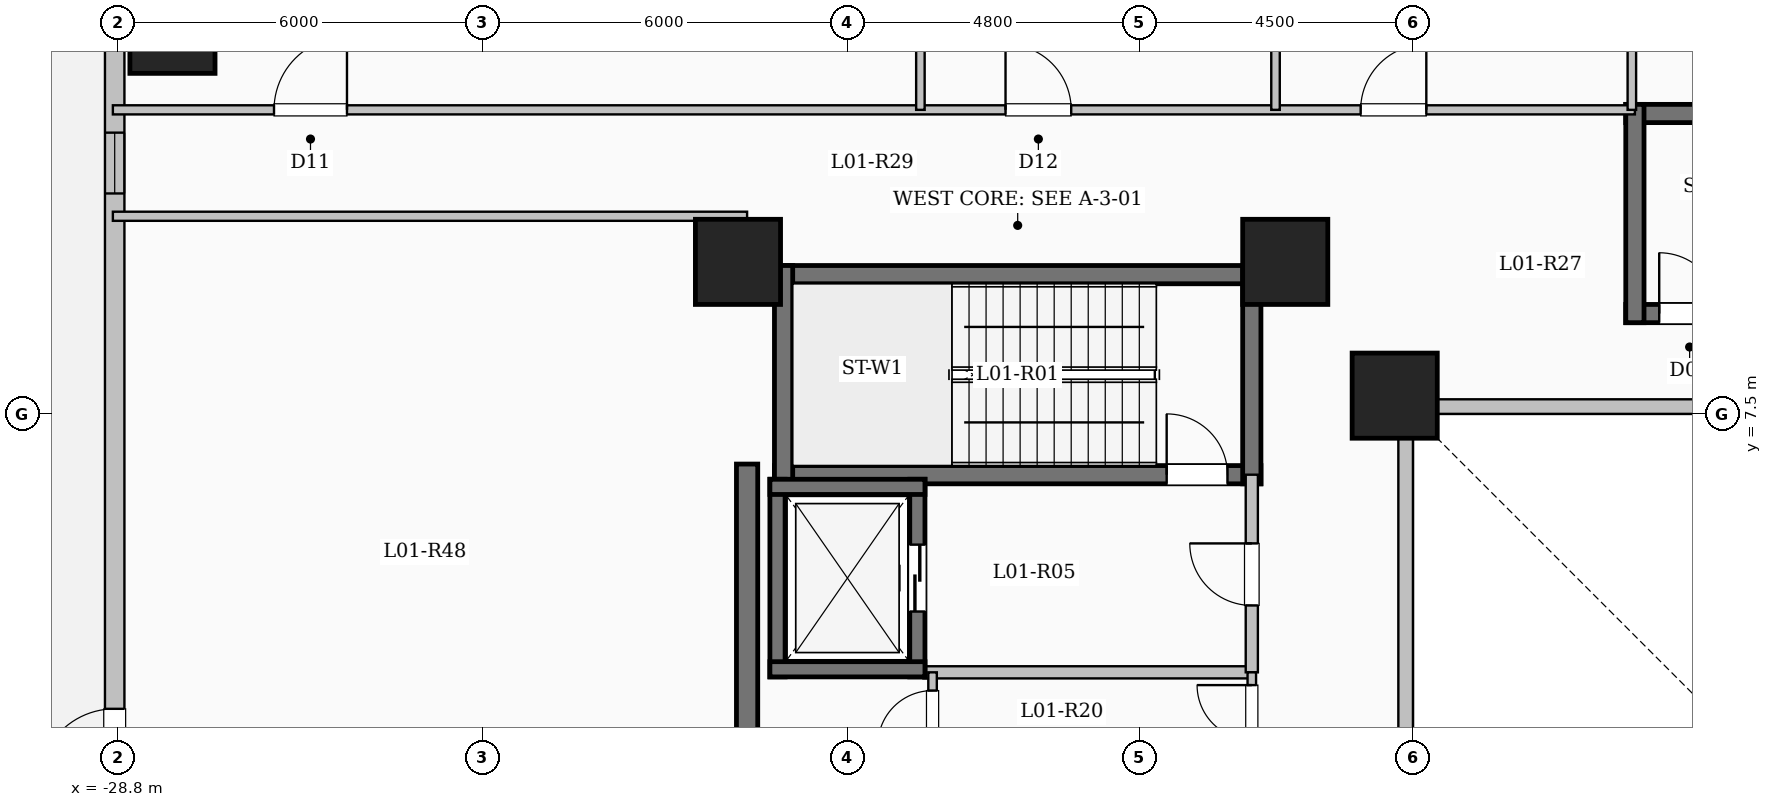
"""IFC4 building model, lengths in metres.
Left out: names, types, materials, properties, quantities, classifications, styles, units other than length and angle.
Written with IfcOpenShell. Run it as: python <this file> out.ifc"""

import sys

from ifc_helpers import new_model, si_unit, direction, frame, frame_2d, origin, origin_2d, place, context, subcontext, project, spatial, rectangle, extrude, element, fill, save


model = new_model("IFC4")
c1 = context("Model", 3, precision=1e-05, world=origin(), true_north=direction((0.0, 1.0)))
c2 = subcontext(c1, "Body", "Model", "MODEL_VIEW")
j1 = project(units=[si_unit("LENGTHUNIT", "METRE"), si_unit("PLANEANGLEUNIT", "RADIAN")], contexts=[c1])
p1 = place(None, origin())
s1 = spatial("IfcSite", under=j1, at=p1, CompositionType="ELEMENT")
p2 = place(p1, origin())
s2 = spatial("IfcBuilding", under=s1, at=p2, CompositionType="ELEMENT")
p3 = place(p2, frame((0.0, 0.0, 5.4)))
s3 = spatial("IfcBuildingStorey", under=s2, at=p3, CompositionType="ELEMENT", Elevation=5.4)
for number, where, z_axis, x_axis in (
    (1, (-7.8, 7.8, 0.0), (0.0, 0.0, 1.0), (1.0, 0.0, 0.0)),
    (2, (-9.6, 10.0, 0.0), (0.0, 0.0, 1.0), (1.0, 0.0, 0.0)),
    (3, (-18.6, 10.0, 0.0), (0.0, 0.0, 1.0), (1.0, 0.0, 0.0)),
    (4, (-27.9, 13.8, 0.0), (0.0, 0.0, 1.0), (1.0, 0.0, 0.0)),
):
    element("IfcColumn", number, at=place(p3, frame(where, z_axis=z_axis, x_axis=x_axis)), inside=s3, PredefinedType="COLUMN", context=c2, shape_type="SweptSolid", body=[
        extrude(rectangle(XDim=1.4, YDim=1.4, at=origin_2d()), origin(), (0.0, 0.0, 1.0), 4.5),
    ])
p4 = place(p3, frame((7.62, 7.62, 0.0), z_axis=(0.0, 0.0, 1.0), x_axis=(-1.0, 0.0, 0.0)))
e5 = element("IfcWall", 5, at=p4, inside=s3, PredefinedType="SOLIDWALL", context=c2, shape_type="SweptSolid", body=[
    extrude(rectangle(XDim=15.24, YDim=0.24, at=frame_2d((7.62, 0.0))), origin(), (0.0, 0.0, 1.0), 4.2),
])
p5 = place(p4, frame((6.92, 0.0, 0.95)))
e6 = element("IfcOpeningElement", 6, at=p5, cuts=e5, PredefinedType="OPENING", context=c2, shape_type="SweptSolid", body=[
    extrude(rectangle(XDim=1.4, YDim=1.5, at=frame_2d((0.7, 0.75))), frame((0.0, 0.13, 0.0), z_axis=(0.0, -1.0, 0.0), x_axis=(1.0, 0.0, 0.0)), (0.0, 0.0, 1.0), 0.26),
])
p6 = place(p3, frame((-7.62, 7.62, 0.0), z_axis=(0.0, 0.0, 1.0), x_axis=(0.0, -1.0, 0.0)))
e7 = element("IfcWall", 7, at=p6, inside=s3, PredefinedType="SOLIDWALL", context=c2, shape_type="SweptSolid", body=[
    extrude(rectangle(XDim=15.24, YDim=0.24, at=frame_2d((7.62, 0.0))), origin(), (0.0, 0.0, 1.0), 4.2),
])
p7 = place(p6, frame((6.92, 0.0, 0.95)))
e8 = element("IfcOpeningElement", 8, at=p7, cuts=e7, PredefinedType="OPENING", context=c2, shape_type="SweptSolid", body=[
    extrude(rectangle(XDim=1.4, YDim=1.5, at=frame_2d((0.7, 0.75))), frame((0.0, 0.13, 0.0), z_axis=(0.0, -1.0, 0.0), x_axis=(1.0, 0.0, 0.0)), (0.0, 0.0, 1.0), 0.26),
])
p8 = place(p3, frame((-28.85, -29.85, 0.0), z_axis=(0.0, 0.0, 1.0), x_axis=(0.0, 1.0, 0.0)))
e9 = element("IfcWall", 9, at=p8, inside=s3, PredefinedType="SOLIDWALL", context=c2, shape_type="SweptSolid", body=[
    extrude(rectangle(XDim=59.7, YDim=0.32, at=frame_2d((29.85, 0.0))), origin(), (0.0, 0.0, 1.0), 4.2),
])
p9 = place(p8, frame((31.25, 0.0, 0.0)))
e10 = element("IfcOpeningElement", 10, at=p9, cuts=e9, PredefinedType="OPENING", context=c2, shape_type="SweptSolid", body=[
    extrude(rectangle(XDim=1.25, YDim=2.25, at=frame_2d((0.625, 1.125))), frame((0.0, 0.17, 0.0), z_axis=(0.0, -1.0, 0.0), x_axis=(1.0, 0.0, 0.0)), (0.0, 0.0, 1.0), 0.34),
])
p10 = place(p8, frame((8.65, 0.0, 0.9)))
e11 = element("IfcOpeningElement", 11, at=p10, cuts=e9, PredefinedType="OPENING", context=c2, shape_type="SweptSolid", body=[
    extrude(rectangle(XDim=2.1, YDim=2.0, at=frame_2d((1.05, 1.0))), frame((0.0, 0.17, 0.0), z_axis=(0.0, -1.0, 0.0), x_axis=(1.0, 0.0, 0.0)), (0.0, 0.0, 1.0), 0.34),
])
p11 = place(p8, frame((20.242, 0.0, 0.9)))
e12 = element("IfcOpeningElement", 12, at=p11, cuts=e9, PredefinedType="OPENING", context=c2, shape_type="SweptSolid", body=[
    extrude(rectangle(XDim=1.7, YDim=1.9, at=frame_2d((0.85, 0.95))), frame((0.0, 0.17, 0.0), z_axis=(0.0, -1.0, 0.0), x_axis=(1.0, 0.0, 0.0)), (0.0, 0.0, 1.0), 0.34),
])
p12 = place(p8, frame((26.03, 0.0, 0.9)))
e13 = element("IfcOpeningElement", 13, at=p12, cuts=e9, PredefinedType="OPENING", context=c2, shape_type="SweptSolid", body=[
    extrude(rectangle(XDim=2.1, YDim=2.0, at=frame_2d((1.05, 1.0))), frame((0.0, 0.17, 0.0), z_axis=(0.0, -1.0, 0.0), x_axis=(1.0, 0.0, 0.0)), (0.0, 0.0, 1.0), 0.34),
])
p13 = place(p8, frame((40.975, 0.0, 0.95)))
e14 = element("IfcOpeningElement", 14, at=p13, cuts=e9, PredefinedType="OPENING", context=c2, shape_type="SweptSolid", body=[
    extrude(rectangle(XDim=1.0, YDim=1.5, at=frame_2d((0.5, 0.75))), frame((0.0, 0.17, 0.0), z_axis=(0.0, -1.0, 0.0), x_axis=(1.0, 0.0, 0.0)), (0.0, 0.0, 1.0), 0.34),
])
p14 = place(p8, frame((50.0, 0.0, 0.9)))
e15 = element("IfcOpeningElement", 15, at=p14, cuts=e9, PredefinedType="OPENING", context=c2, shape_type="SweptSolid", body=[
    extrude(rectangle(XDim=2.1, YDim=2.0, at=frame_2d((1.05, 1.0))), frame((0.0, 0.17, 0.0), z_axis=(0.0, -1.0, 0.0), x_axis=(1.0, 0.0, 0.0)), (0.0, 0.0, 1.0), 0.34),
])
p15 = place(p3, frame((-18.0, 9.79, 0.0), z_axis=(0.0, 0.0, 1.0), x_axis=(1.0, 0.0, 0.0)))
e16 = element("IfcWall", 16, at=p15, inside=s3, PredefinedType="SHEAR", context=c2, shape_type="SweptSolid", body=[
    extrude(rectangle(XDim=8.0, YDim=0.3, at=frame_2d((4.0, 0.0))), origin(), (0.0, 0.0, 1.0), 4.5),
])
p16 = place(p3, frame((-18.0, 6.5, 0.0), z_axis=(0.0, 0.0, 1.0), x_axis=(1.0, 0.0, 0.0)))
e17 = element("IfcWall", 17, at=p16, inside=s3, PredefinedType="SHEAR", context=c2, shape_type="SweptSolid", body=[
    extrude(rectangle(XDim=8.0, YDim=0.3, at=frame_2d((4.0, 0.0))), origin(), (0.0, 0.0, 1.0), 4.5),
])
p17 = place(p16, frame((6.45, 0.0, 0.0)))
e18 = element("IfcOpeningElement", 18, at=p17, cuts=e17, PredefinedType="OPENING", context=c2, shape_type="SweptSolid", body=[
    extrude(rectangle(XDim=1.0, YDim=2.15, at=frame_2d((0.5, 1.075))), frame((0.0, 0.16, 0.0), z_axis=(0.0, -1.0, 0.0), x_axis=(1.0, 0.0, 0.0)), (0.0, 0.0, 1.0), 0.32),
])
for number, where, z_axis, x_axis in (
    (19, (-17.85, 6.35, 0.0), (0.0, 0.0, 1.0), (0.0, 1.0, 0.0)),
    (20, (-10.15, 6.35, 0.0), (0.0, 0.0, 1.0), (0.0, 1.0, 0.0)),
):
    element("IfcWall", number, at=place(p3, frame(where, z_axis=z_axis, x_axis=x_axis)), inside=s3, PredefinedType="SHEAR", context=c2, shape_type="SweptSolid", body=[
        extrude(rectangle(XDim=3.59, YDim=0.3, at=frame_2d((1.795, 0.0))), origin(), (0.0, 0.0, 1.0), 4.5),
    ])
p18 = place(p3, frame((-4.0, 12.44, 0.0), z_axis=(0.0, 0.0, 1.0), x_axis=(1.0, 0.0, 0.0)))
e21 = element("IfcWall", 21, at=p18, inside=s3, PredefinedType="SHEAR", context=c2, shape_type="SweptSolid", body=[
    extrude(rectangle(XDim=8.0, YDim=0.3, at=frame_2d((4.0, 0.0))), origin(), (0.0, 0.0, 1.0), 4.5),
])
p19 = place(p3, frame((-4.0, 9.15, 0.0), z_axis=(0.0, 0.0, 1.0), x_axis=(1.0, 0.0, 0.0)))
e22 = element("IfcWall", 22, at=p19, inside=s3, PredefinedType="SHEAR", context=c2, shape_type="SweptSolid", body=[
    extrude(rectangle(XDim=8.0, YDim=0.3, at=frame_2d((4.0, 0.0))), origin(), (0.0, 0.0, 1.0), 4.5),
])
p20 = place(p19, frame((0.55, 0.0, 0.0)))
e23 = element("IfcOpeningElement", 23, at=p20, cuts=e22, PredefinedType="OPENING", context=c2, shape_type="SweptSolid", body=[
    extrude(rectangle(XDim=1.0, YDim=2.15, at=frame_2d((0.5, 1.075))), frame((0.0, 0.16, 0.0), z_axis=(0.0, -1.0, 0.0), x_axis=(1.0, 0.0, 0.0)), (0.0, 0.0, 1.0), 0.32),
])
p21 = place(p3, frame((-3.85, 9.0, 0.0), z_axis=(0.0, 0.0, 1.0), x_axis=(0.0, 1.0, 0.0)))
e24 = element("IfcWall", 24, at=p21, inside=s3, PredefinedType="SHEAR", context=c2, shape_type="SweptSolid", body=[
    extrude(rectangle(XDim=3.59, YDim=0.3, at=frame_2d((1.795, 0.0))), origin(), (0.0, 0.0, 1.0), 4.5),
])
p22 = place(p3, frame((-15.55, 3.25, 0.0), z_axis=(0.0, 0.0, 1.0), x_axis=(1.0, 0.0, 0.0)))
e25 = element("IfcWall", 25, at=p22, inside=s3, PredefinedType="SOLIDWALL", context=c2, shape_type="SweptSolid", body=[
    extrude(rectangle(XDim=5.4, YDim=0.2, at=frame_2d((2.7, 0.0))), origin(), (0.0, 0.0, 1.0), 4.2),
])
p23 = place(p3, frame((-10.15, 3.25, 0.0), z_axis=(0.0, 0.0, 1.0), x_axis=(0.0, 1.0, 0.0)))
e26 = element("IfcWall", 26, at=p23, inside=s3, PredefinedType="SOLIDWALL", context=c2, shape_type="SweptSolid", body=[
    extrude(rectangle(XDim=3.25, YDim=0.2, at=frame_2d((1.625, 0.0))), origin(), (0.0, 0.0, 1.0), 4.2),
])
p24 = place(p23, frame((1.1, 0.0, 0.0)))
e27 = element("IfcOpeningElement", 27, at=p24, cuts=e26, PredefinedType="OPENING", context=c2, shape_type="SweptSolid", body=[
    extrude(rectangle(XDim=1.02, YDim=2.15, at=frame_2d((0.51, 1.075))), frame((0.0, 0.11, 0.0), z_axis=(0.0, -1.0, 0.0), x_axis=(1.0, 0.0, 0.0)), (0.0, 0.0, 1.0), 0.22),
])
p25 = place(p3, frame((-17.95, 3.175, 0.0), z_axis=(0.0, 0.0, 1.0), x_axis=(0.0, 1.0, 0.0)))
e28 = element("IfcWall", 28, at=p25, inside=s3, PredefinedType="SHEAR", context=c2, shape_type="SweptSolid", body=[
    extrude(rectangle(XDim=3.25, YDim=0.25, at=frame_2d((1.625, 0.0))), origin(), (0.0, 0.0, 1.0), 4.5),
])
p26 = place(p3, frame((-15.65, 3.175, 0.0), z_axis=(0.0, 0.0, 1.0), x_axis=(0.0, 1.0, 0.0)))
e29 = element("IfcWall", 29, at=p26, inside=s3, PredefinedType="SHEAR", context=c2, shape_type="SweptSolid", body=[
    extrude(rectangle(XDim=3.25, YDim=0.25, at=frame_2d((1.625, 0.0))), origin(), (0.0, 0.0, 1.0), 4.5),
])
p27 = place(p26, frame((1.075, 0.0, 0.0)))
e30 = element("IfcOpeningElement", 30, at=p27, cuts=e29, PredefinedType="OPENING", context=c2, shape_type="SweptSolid", body=[
    extrude(rectangle(XDim=1.1, YDim=2.15, at=frame_2d((0.55, 1.075))), frame((0.0, 0.135, 0.0), z_axis=(0.0, -1.0, 0.0), x_axis=(1.0, 0.0, 0.0)), (0.0, 0.0, 1.0), 0.27),
])
for number, where, z_axis, x_axis in (
    (31, (-18.075, 3.3, 0.0), (0.0, 0.0, 1.0), (1.0, 0.0, 0.0)),
    (32, (-18.075, 6.3, 0.0), (0.0, 0.0, 1.0), (1.0, 0.0, 0.0)),
):
    element("IfcWall", number, at=place(p3, frame(where, z_axis=z_axis, x_axis=x_axis)), inside=s3, PredefinedType="SHEAR", context=c2, shape_type="SweptSolid", body=[
        extrude(rectangle(XDim=2.55, YDim=0.25, at=frame_2d((1.275, 0.0))), origin(), (0.0, 0.0, 1.0), 4.5),
    ])
p28 = place(p3, frame((-18.45, -7.375, 0.0), z_axis=(0.0, 0.0, 1.0), x_axis=(0.0, 1.0, 0.0)))
e33 = element("IfcWall", 33, at=p28, inside=s3, PredefinedType="SHEAR", context=c2, shape_type="SweptSolid", body=[
    extrude(rectangle(XDim=14.05, YDim=0.35, at=frame_2d((7.025, 0.0))), origin(), (0.0, 0.0, 1.0), 4.5),
])
p29 = place(p3, frame((-10.15, 1.92, 0.0), z_axis=(0.0, 0.0, 1.0), x_axis=(0.0, 1.0, 0.0)))
e34 = element("IfcWall", 34, at=p29, inside=s3, PredefinedType="PARTITIONING", context=c2, shape_type="SweptSolid", body=[
    extrude(rectangle(XDim=1.33, YDim=0.14, at=frame_2d((0.665, 0.0))), origin(), (0.0, 0.0, 1.0), 4.2),
])
p30 = place(p29, frame((0.22, 0.0, 0.0)))
e35 = element("IfcOpeningElement", 35, at=p30, cuts=e34, PredefinedType="OPENING", context=c2, shape_type="SweptSolid", body=[
    extrude(rectangle(XDim=0.9, YDim=2.08, at=frame_2d((0.45, 1.04))), frame((0.0, 0.08, 0.0), z_axis=(0.0, -1.0, 0.0), x_axis=(1.0, 0.0, 0.0)), (0.0, 0.0, 1.0), 0.16),
])
p31 = place(p3, frame((-15.4, -7.2, 0.0), z_axis=(0.0, 0.0, 1.0), x_axis=(0.0, 1.0, 0.0)))
e36 = element("IfcWall", 36, at=p31, inside=s3, PredefinedType="PARTITIONING", context=c2, shape_type="SweptSolid", body=[
    extrude(rectangle(XDim=10.45, YDim=0.14, at=frame_2d((5.225, 0.0))), origin(), (0.0, 0.0, 1.0), 4.2),
])
p32 = place(p31, frame((9.25, 0.0, 0.0)))
e37 = element("IfcOpeningElement", 37, at=p32, cuts=e36, PredefinedType="OPENING", context=c2, shape_type="SweptSolid", body=[
    extrude(rectangle(XDim=0.9, YDim=2.08, at=frame_2d((0.45, 1.04))), frame((0.0, 0.08, 0.0), z_axis=(0.0, -1.0, 0.0), x_axis=(1.0, 0.0, 0.0)), (0.0, 0.0, 1.0), 0.16),
])
p33 = place(p3, frame((-28.88, 12.5, 0.0), z_axis=(0.0, 0.0, 1.0), x_axis=(1.0, 0.0, 0.0)))
e38 = element("IfcWall", 38, at=p33, inside=s3, PredefinedType="PARTITIONING", context=c2, shape_type="SweptSolid", body=[
    extrude(rectangle(XDim=25.03, YDim=0.15, at=frame_2d((12.515, 0.0))), origin(), (0.0, 0.0, 1.0), 4.2),
])
p34 = place(p33, frame((2.65, 0.0, 0.0)))
e39 = element("IfcOpeningElement", 39, at=p34, cuts=e38, PredefinedType="OPENING", context=c2, shape_type="SweptSolid", body=[
    extrude(rectangle(XDim=1.2, YDim=2.15, at=frame_2d((0.6, 1.075))), frame((0.0, 0.085, 0.0), z_axis=(0.0, -1.0, 0.0), x_axis=(1.0, 0.0, 0.0)), (0.0, 0.0, 1.0), 0.17),
])
p35 = place(p33, frame((14.68, 0.0, 0.0)))
e40 = element("IfcOpeningElement", 40, at=p35, cuts=e38, PredefinedType="OPENING", context=c2, shape_type="SweptSolid", body=[
    extrude(rectangle(XDim=1.08, YDim=2.15, at=frame_2d((0.54, 1.075))), frame((0.0, 0.085, 0.0), z_axis=(0.0, -1.0, 0.0), x_axis=(1.0, 0.0, 0.0)), (0.0, 0.0, 1.0), 0.17),
])
p36 = place(p33, frame((20.52, 0.0, 0.0)))
e41 = element("IfcOpeningElement", 41, at=p36, cuts=e38, PredefinedType="OPENING", context=c2, shape_type="SweptSolid", body=[
    extrude(rectangle(XDim=1.08, YDim=2.15, at=frame_2d((0.54, 1.075))), frame((0.0, 0.085, 0.0), z_axis=(0.0, -1.0, 0.0), x_axis=(1.0, 0.0, 0.0)), (0.0, 0.0, 1.0), 0.17),
])
p37 = place(p3, frame((-3.9, 12.5, 0.0), z_axis=(0.0, 0.0, 1.0), x_axis=(0.0, 1.0, 0.0)))
e42 = element("IfcWall", 42, at=p37, inside=s3, PredefinedType="PARTITIONING", context=c2, shape_type="SweptSolid", body=[
    extrude(rectangle(XDim=17.38, YDim=0.14, at=frame_2d((8.69, 0.0))), origin(), (0.0, 0.0, 1.0), 4.2),
])
p38 = place(p3, frame((-15.6, 12.5, 0.0), z_axis=(0.0, 0.0, 1.0), x_axis=(0.0, 1.0, 0.0)))
e43 = element("IfcWall", 43, at=p38, inside=s3, PredefinedType="PARTITIONING", context=c2, shape_type="SweptSolid", body=[
    extrude(rectangle(XDim=17.38, YDim=0.14, at=frame_2d((8.69, 0.0))), origin(), (0.0, 0.0, 1.0), 3.385),
])
p39 = place(p3, frame((-9.76, 12.5, 0.0), z_axis=(0.0, 0.0, 1.0), x_axis=(0.0, 1.0, 0.0)))
e44 = element("IfcWall", 44, at=p39, inside=s3, PredefinedType="PARTITIONING", context=c2, shape_type="SweptSolid", body=[
    extrude(rectangle(XDim=17.38, YDim=0.14, at=frame_2d((8.69, 0.0))), origin(), (0.0, 0.0, 1.0), 4.2),
])
p40 = place(p3, frame((-28.88, 10.75, 0.0), z_axis=(0.0, 0.0, 1.0), x_axis=(1.0, 0.0, 0.0)))
e45 = element("IfcWall", 45, at=p40, inside=s3, PredefinedType="PARTITIONING", context=c2, shape_type="SweptSolid", body=[
    extrude(rectangle(XDim=10.43, YDim=0.15, at=frame_2d((5.215, 0.0))), origin(), (0.0, 0.0, 1.0), 4.2),
])
p41 = place(p9, origin())
e46 = element("IfcDoor", 46, at=p41, inside=s3, OperationType="SINGLE_SWING_LEFT", PredefinedType="DOOR", context=c2, shape_type="SweptSolid", body=[
    extrude(rectangle(XDim=1.25, YDim=2.25, at=frame_2d((0.625, 1.125))), frame((0.0, 0.025, 0.0), z_axis=(0.0, -1.0, 0.0), x_axis=(1.0, 0.0, 0.0)), (0.0, 0.0, 1.0), 0.05),
])
fill(e10, e46)
p42 = place(p13, origin())
e47 = element("IfcWindow", 47, at=p42, inside=s3, PartitioningType="SINGLE_PANEL", PredefinedType="WINDOW", context=c2, shape_type="SweptSolid", body=[
    extrude(rectangle(XDim=1.0, YDim=1.5, at=frame_2d((0.5, 0.75))), frame((0.0, 0.03, 0.0), z_axis=(0.0, -1.0, 0.0), x_axis=(1.0, 0.0, 0.0)), (0.0, 0.0, 1.0), 0.06),
])
fill(e14, e47)
p43 = place(p17, origin())
e48 = element("IfcDoor", 48, at=p43, inside=s3, OperationType="SINGLE_SWING_LEFT", PredefinedType="DOOR", context=c2, shape_type="SweptSolid", body=[
    extrude(rectangle(XDim=1.0, YDim=2.15, at=frame_2d((0.5, 1.075))), frame((0.0, 0.025, 0.0), z_axis=(0.0, -1.0, 0.0), x_axis=(1.0, 0.0, 0.0)), (0.0, 0.0, 1.0), 0.05),
])
fill(e18, e48)
p44 = place(p20, origin())
e49 = element("IfcDoor", 49, at=p44, inside=s3, OperationType="SINGLE_SWING_LEFT", PredefinedType="DOOR", context=c2, shape_type="SweptSolid", body=[
    extrude(rectangle(XDim=1.0, YDim=2.15, at=frame_2d((0.5, 1.075))), frame((0.0, 0.025, 0.0), z_axis=(0.0, -1.0, 0.0), x_axis=(1.0, 0.0, 0.0)), (0.0, 0.0, 1.0), 0.05),
])
fill(e23, e49)
p45 = place(p24, origin())
e50 = element("IfcDoor", 50, at=p45, inside=s3, OperationType="SINGLE_SWING_RIGHT", PredefinedType="DOOR", context=c2, shape_type="SweptSolid", body=[
    extrude(rectangle(XDim=1.02, YDim=2.15, at=frame_2d((0.51, 1.075))), frame((0.0, 0.025, 0.0), z_axis=(0.0, -1.0, 0.0), x_axis=(1.0, 0.0, 0.0)), (0.0, 0.0, 1.0), 0.05),
])
fill(e27, e50)
p46 = place(p27, origin())
e51 = element("IfcDoor", 51, at=p46, inside=s3, OperationType="SLIDING_TO_LEFT", PredefinedType="DOOR", context=c2, shape_type="SweptSolid", body=[
    extrude(rectangle(XDim=1.1, YDim=2.15, at=frame_2d((0.55, 1.075))), frame((0.0, 0.025, 0.0), z_axis=(0.0, -1.0, 0.0), x_axis=(1.0, 0.0, 0.0)), (0.0, 0.0, 1.0), 0.05),
])
fill(e30, e51)
p47 = place(p30, origin())
e52 = element("IfcDoor", 52, at=p47, inside=s3, OperationType="SINGLE_SWING_RIGHT", PredefinedType="DOOR", context=c2, shape_type="SweptSolid", body=[
    extrude(rectangle(XDim=0.9, YDim=2.08, at=frame_2d((0.45, 1.04))), frame((0.0, 0.025, 0.0), z_axis=(0.0, -1.0, 0.0), x_axis=(1.0, 0.0, 0.0)), (0.0, 0.0, 1.0), 0.05),
])
fill(e35, e52)
p48 = place(p32, origin())
e53 = element("IfcDoor", 53, at=p48, inside=s3, OperationType="SINGLE_SWING_LEFT", PredefinedType="DOOR", context=c2, shape_type="SweptSolid", body=[
    extrude(rectangle(XDim=0.9, YDim=2.08, at=frame_2d((0.45, 1.04))), frame((0.0, 0.025, 0.0), z_axis=(0.0, -1.0, 0.0), x_axis=(1.0, 0.0, 0.0)), (0.0, 0.0, 1.0), 0.05),
])
fill(e37, e53)
p49 = place(p34, origin())
e54 = element("IfcDoor", 54, at=p49, inside=s3, OperationType="SINGLE_SWING_RIGHT", PredefinedType="DOOR", context=c2, shape_type="SweptSolid", body=[
    extrude(rectangle(XDim=1.2, YDim=2.15, at=frame_2d((0.6, 1.075))), frame((0.0, 0.025, 0.0), z_axis=(0.0, -1.0, 0.0), x_axis=(1.0, 0.0, 0.0)), (0.0, 0.0, 1.0), 0.05),
])
fill(e39, e54)
p50 = place(p35, origin())
e55 = element("IfcDoor", 55, at=p50, inside=s3, OperationType="SINGLE_SWING_LEFT", PredefinedType="DOOR", context=c2, shape_type="SweptSolid", body=[
    extrude(rectangle(XDim=1.08, YDim=2.15, at=frame_2d((0.54, 1.075))), frame((0.0, 0.025, 0.0), z_axis=(0.0, -1.0, 0.0), x_axis=(1.0, 0.0, 0.0)), (0.0, 0.0, 1.0), 0.05),
])
fill(e40, e55)
p51 = place(p36, origin())
e56 = element("IfcDoor", 56, at=p51, inside=s3, OperationType="SINGLE_SWING_RIGHT", PredefinedType="DOOR", context=c2, shape_type="SweptSolid", body=[
    extrude(rectangle(XDim=1.08, YDim=2.15, at=frame_2d((0.54, 1.075))), frame((0.0, 0.025, 0.0), z_axis=(0.0, -1.0, 0.0), x_axis=(1.0, 0.0, 0.0)), (0.0, 0.0, 1.0), 0.05),
])
fill(e41, e56)
save(model, sys.argv[1])
